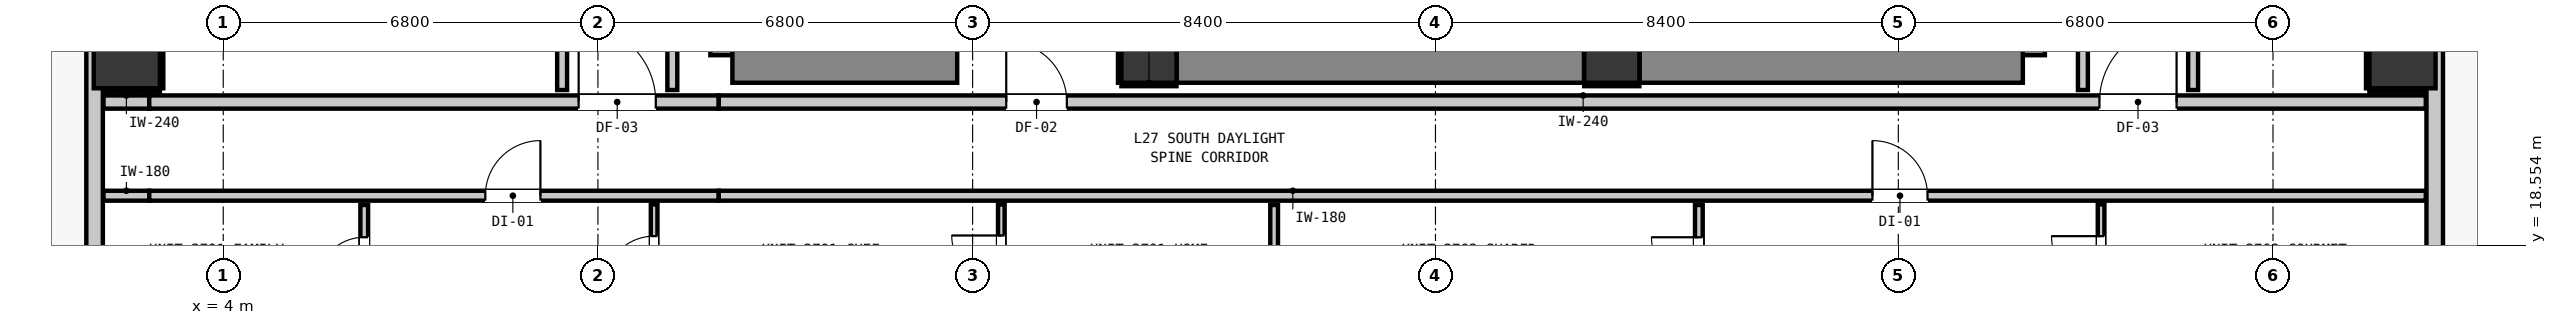
"""IFC4 building model, lengths in metres.
Left out: names, types, materials, properties, quantities, classifications, styles, units other than length and angle.
Written with IfcOpenShell. Run it as: python <this file> out.ifc"""

import sys

from ifc_helpers import new_model, si_unit, direction, frame, frame_2d, origin, origin_2d, place, context, subcontext, project, spatial, rectangle, extrude, element, fill, save


model = new_model("IFC4")
c1 = context("Model", 3, precision=1e-05, world=origin(), true_north=direction((0.0, 1.0)))
c2 = subcontext(c1, "Body", "Model", "MODEL_VIEW")
j1 = project(units=[si_unit("LENGTHUNIT", "METRE"), si_unit("PLANEANGLEUNIT", "RADIAN")], contexts=[c1])
p1 = place(None, origin())
s1 = spatial("IfcSite", under=j1, at=p1, CompositionType="ELEMENT")
p2 = place(p1, origin())
s2 = spatial("IfcBuilding", under=s1, at=p2, CompositionType="ELEMENT")
p3 = place(p2, frame((0.0, 0.0, 96.12)))
s3 = spatial("IfcBuildingStorey", under=s2, at=p3, CompositionType="ELEMENT", Elevation=96.12)
for number, where, z_axis, x_axis in (
    (1, (20.8, 22.0, 0.0), (0.0, 0.0, 1.0), (1.0, 0.0, 0.0)),
    (2, (29.2, 22.0, 0.0), (0.0, 0.0, 1.0), (1.0, 0.0, 0.0)),
):
    element("IfcColumn", number, at=place(p3, frame(where, z_axis=z_axis, x_axis=x_axis)), inside=s3, PredefinedType="COLUMN", context=c2, shape_type="SweptSolid", body=[
        extrude(rectangle(XDim=1.0, YDim=1.0, at=origin_2d()), origin(), (0.0, 0.0, 1.0), 3.32),
    ])
p4 = place(p3, frame((13.34, 22.0, 0.0), z_axis=(0.0, 0.0, 1.0), x_axis=(0.0, 1.0, 0.0)))
e3 = element("IfcWall", 3, at=p4, inside=s3, PredefinedType="SHEAR", context=c2, shape_type="SweptSolid", body=[
    extrude(rectangle(XDim=8.195, YDim=1.0, at=frame_2d((4.098, 0.0))), origin(), (0.0, 0.0, 1.0), 3.32),
])
p5 = place(p3, frame((13.24, 22.0, 0.0), z_axis=(0.0, 0.0, 1.0), x_axis=(1.0, 0.0, 0.0)))
e4 = element("IfcWall", 4, at=p5, inside=s3, PredefinedType="SHEAR", context=c2, shape_type="SweptSolid", body=[
    extrude(rectangle(XDim=4.08, YDim=1.0, at=frame_2d((2.04, 0.0))), origin(), (0.0, 0.0, 1.0), 3.32),
])
p6 = place(p3, frame((36.56, 22.0, 0.0), z_axis=(0.0, 0.0, 1.0), x_axis=(0.0, 1.0, 0.0)))
e5 = element("IfcWall", 5, at=p6, inside=s3, PredefinedType="SHEAR", context=c2, shape_type="SweptSolid", body=[
    extrude(rectangle(XDim=8.195, YDim=1.0, at=frame_2d((4.098, 0.0))), origin(), (0.0, 0.0, 1.0), 3.32),
])
p7 = place(p3, frame((29.705, 22.0, 0.0), z_axis=(0.0, 0.0, 1.0), x_axis=(1.0, 0.0, 0.0)))
e6 = element("IfcWall", 6, at=p7, inside=s3, PredefinedType="SHEAR", context=c2, shape_type="SweptSolid", body=[
    extrude(rectangle(XDim=6.955, YDim=1.0, at=frame_2d((3.478, 0.0))), origin(), (0.0, 0.0, 1.0), 3.32),
])
p8 = place(p3, frame((21.305, 22.0, 0.0), z_axis=(0.0, 0.0, 1.0), x_axis=(1.0, 0.0, 0.0)))
e7 = element("IfcWall", 7, at=p8, inside=s3, PredefinedType="SHEAR", context=c2, shape_type="SweptSolid", body=[
    extrude(rectangle(XDim=7.39, YDim=1.0, at=frame_2d((3.695, 0.0))), origin(), (0.0, 0.0, 1.0), 3.32),
])
for number, where, z_axis, x_axis in (
    (8, (2.25, 22.0, 0.0), (0.0, 0.0, 1.0), (1.0, 0.0, 0.0)),
    (9, (43.55, 22.0, 0.0), (0.0, 0.0, 1.0), (1.0, 0.0, 0.0)),
):
    element("IfcColumn", number, at=place(p3, frame(where, z_axis=z_axis, x_axis=x_axis)), inside=s3, PredefinedType="COLUMN", context=c2, shape_type="SweptSolid", body=[
        extrude(rectangle(XDim=1.2, YDim=1.2, at=origin_2d()), origin(), (0.0, 0.0, 1.0), 3.32),
    ])
p9 = place(p3, frame((1.665, 16.365, 0.0), z_axis=(0.0, 0.0, 1.0), x_axis=(0.0, 1.0, 0.0)))
e10 = element("IfcWall", 10, at=p9, inside=s3, PredefinedType="STANDARD", context=c2, shape_type="SweptSolid", body=[
    extrude(rectangle(XDim=34.67, YDim=0.3, at=frame_2d((17.335, 0.0))), origin(), (0.0, 0.0, 1.0), 3.06),
])
p10 = place(p9, frame((6.854, 0.0, 0.0)))
e11 = element("IfcOpeningElement", 11, at=p10, cuts=e10, PredefinedType="OPENING", context=c2, shape_type="SweptSolid", body=[
    extrude(rectangle(XDim=1.0, YDim=2.15, at=frame_2d((0.5, 1.075))), frame((0.0, 0.16, 0.0), z_axis=(0.0, -1.0, 0.0), x_axis=(1.0, 0.0, 0.0)), (0.0, 0.0, 1.0), 0.32),
])
p11 = place(p9, frame((32.839, 0.0, 0.85)))
e12 = element("IfcOpeningElement", 12, at=p11, cuts=e10, PredefinedType="OPENING", context=c2, shape_type="SweptSolid", body=[
    extrude(rectangle(XDim=1.05, YDim=1.65, at=frame_2d((0.525, 0.825))), frame((0.0, 0.16, 0.0), z_axis=(0.0, -1.0, 0.0), x_axis=(1.0, 0.0, 0.0)), (0.0, 0.0, 1.0), 0.32),
])
p12 = place(p9, frame((10.044, 0.0, 0.85)))
e13 = element("IfcOpeningElement", 13, at=p12, cuts=e10, PredefinedType="OPENING", context=c2, shape_type="SweptSolid", body=[
    extrude(rectangle(XDim=2.4, YDim=1.95, at=frame_2d((1.2, 0.975))), frame((0.0, 0.16, 0.0), z_axis=(0.0, -1.0, 0.0), x_axis=(1.0, 0.0, 0.0)), (0.0, 0.0, 1.0), 0.32),
])
p13 = place(p9, frame((19.145, 0.0, 0.85)))
e14 = element("IfcOpeningElement", 14, at=p13, cuts=e10, PredefinedType="OPENING", context=c2, shape_type="SweptSolid", body=[
    extrude(rectangle(XDim=2.4, YDim=1.95, at=frame_2d((1.2, 0.975))), frame((0.0, 0.16, 0.0), z_axis=(0.0, -1.0, 0.0), x_axis=(1.0, 0.0, 0.0)), (0.0, 0.0, 1.0), 0.32),
])
p14 = place(p3, frame((44.135, 51.035, 0.0), z_axis=(0.0, 0.0, 1.0), x_axis=(0.0, -1.0, 0.0)))
e15 = element("IfcWall", 15, at=p14, inside=s3, PredefinedType="STANDARD", context=c2, shape_type="SweptSolid", body=[
    extrude(rectangle(XDim=34.67, YDim=0.3, at=frame_2d((17.335, 0.0))), origin(), (0.0, 0.0, 1.0), 3.06),
])
p15 = place(p14, frame((0.901, 0.0, 0.0)))
e16 = element("IfcOpeningElement", 16, at=p15, cuts=e15, PredefinedType="OPENING", context=c2, shape_type="SweptSolid", body=[
    extrude(rectangle(XDim=1.0, YDim=2.15, at=frame_2d((0.5, 1.075))), frame((0.0, 0.16, 0.0), z_axis=(0.0, -1.0, 0.0), x_axis=(1.0, 0.0, 0.0)), (0.0, 0.0, 1.0), 0.32),
])
p16 = place(p14, frame((3.303, 0.0, 0.85)))
e17 = element("IfcOpeningElement", 17, at=p16, cuts=e15, PredefinedType="OPENING", context=c2, shape_type="SweptSolid", body=[
    extrude(rectangle(XDim=2.4, YDim=1.95, at=frame_2d((1.2, 0.975))), frame((0.0, 0.16, 0.0), z_axis=(0.0, -1.0, 0.0), x_axis=(1.0, 0.0, 0.0)), (0.0, 0.0, 1.0), 0.32),
])
p17 = place(p14, frame((21.61, 0.0, 0.85)))
e18 = element("IfcOpeningElement", 18, at=p17, cuts=e15, PredefinedType="OPENING", context=c2, shape_type="SweptSolid", body=[
    extrude(rectangle(XDim=2.4, YDim=1.95, at=frame_2d((1.2, 0.975))), frame((0.0, 0.16, 0.0), z_axis=(0.0, -1.0, 0.0), x_axis=(1.0, 0.0, 0.0)), (0.0, 0.0, 1.0), 0.32),
])
p18 = place(p3, frame((1.827, 21.15, 0.0), z_axis=(0.0, 0.0, 1.0), x_axis=(1.0, 0.0, 0.0)))
e19 = element("IfcWall", 19, at=p18, inside=s3, PredefinedType="PARTITIONING", context=c2, shape_type="SweptSolid", body=[
    extrude(rectangle(XDim=0.83, YDim=0.24, at=frame_2d((0.415, 0.0))), origin(), (0.0, 0.0, 1.0), 3.06),
])
p19 = place(p3, frame((2.657, 21.15, 0.0), z_axis=(0.0, 0.0, 1.0), x_axis=(1.0, 0.0, 0.0)))
e20 = element("IfcWall", 20, at=p19, inside=s3, PredefinedType="PARTITIONING", context=c2, shape_type="SweptSolid", body=[
    extrude(rectangle(XDim=10.336, YDim=0.24, at=frame_2d((5.168, 0.0))), origin(), (0.0, 0.0, 1.0), 2.445),
])
p20 = place(p19, frame((7.793, 0.0, 0.0)))
e21 = element("IfcOpeningElement", 21, at=p20, cuts=e20, PredefinedType="OPENING", context=c2, shape_type="SweptSolid", body=[
    extrude(rectangle(XDim=1.4, YDim=2.15, at=frame_2d((0.7, 1.075))), frame((0.0, 0.13, 0.0), z_axis=(0.0, -1.0, 0.0), x_axis=(1.0, 0.0, 0.0)), (0.0, 0.0, 1.0), 0.26),
])
p21 = place(p3, frame((12.993, 21.15, 0.0), z_axis=(0.0, 0.0, 1.0), x_axis=(1.0, 0.0, 0.0)))
e22 = element("IfcWall", 22, at=p21, inside=s3, PredefinedType="PARTITIONING", context=c2, shape_type="SweptSolid", body=[
    extrude(rectangle(XDim=30.98, YDim=0.24, at=frame_2d((15.49, 0.0))), origin(), (0.0, 0.0, 1.0), 3.06),
])
p22 = place(p21, frame((5.217, 0.0, 0.0)))
e23 = element("IfcOpeningElement", 23, at=p22, cuts=e22, PredefinedType="OPENING", context=c2, shape_type="SweptSolid", body=[
    extrude(rectangle(XDim=1.1, YDim=2.15, at=frame_2d((0.55, 1.075))), frame((0.0, 0.13, 0.0), z_axis=(0.0, -1.0, 0.0), x_axis=(1.0, 0.0, 0.0)), (0.0, 0.0, 1.0), 0.26),
])
p23 = place(p21, frame((25.057, 0.0, 0.0)))
e24 = element("IfcOpeningElement", 24, at=p23, cuts=e22, PredefinedType="OPENING", context=c2, shape_type="SweptSolid", body=[
    extrude(rectangle(XDim=1.4, YDim=2.15, at=frame_2d((0.7, 1.075))), frame((0.0, 0.13, 0.0), z_axis=(0.0, -1.0, 0.0), x_axis=(1.0, 0.0, 0.0)), (0.0, 0.0, 1.0), 0.26),
])
p24 = place(p3, frame((1.827, 19.45, 0.0), z_axis=(0.0, 0.0, 1.0), x_axis=(1.0, 0.0, 0.0)))
e25 = element("IfcWall", 25, at=p24, inside=s3, PredefinedType="PARTITIONING", context=c2, shape_type="SweptSolid", body=[
    extrude(rectangle(XDim=0.83, YDim=0.18, at=frame_2d((0.415, 0.0))), origin(), (0.0, 0.0, 1.0), 3.06),
])
p25 = place(p3, frame((2.657, 19.45, 0.0), z_axis=(0.0, 0.0, 1.0), x_axis=(1.0, 0.0, 0.0)))
e26 = element("IfcWall", 26, at=p25, inside=s3, PredefinedType="PARTITIONING", context=c2, shape_type="SweptSolid", body=[
    extrude(rectangle(XDim=10.336, YDim=0.18, at=frame_2d((5.168, 0.0))), origin(), (0.0, 0.0, 1.0), 2.445),
])
p26 = place(p25, frame((6.099, 0.0, 0.0)))
e27 = element("IfcOpeningElement", 27, at=p26, cuts=e26, PredefinedType="OPENING", context=c2, shape_type="SweptSolid", body=[
    extrude(rectangle(XDim=1.0, YDim=2.15, at=frame_2d((0.5, 1.075))), frame((0.0, 0.1, 0.0), z_axis=(0.0, -1.0, 0.0), x_axis=(1.0, 0.0, 0.0)), (0.0, 0.0, 1.0), 0.2),
])
p27 = place(p3, frame((12.993, 19.45, 0.0), z_axis=(0.0, 0.0, 1.0), x_axis=(1.0, 0.0, 0.0)))
e28 = element("IfcWall", 28, at=p27, inside=s3, PredefinedType="PARTITIONING", context=c2, shape_type="SweptSolid", body=[
    extrude(rectangle(XDim=30.98, YDim=0.18, at=frame_2d((15.49, 0.0))), origin(), (0.0, 0.0, 1.0), 3.06),
])
p28 = place(p27, frame((20.937, 0.0, 0.0)))
e29 = element("IfcOpeningElement", 29, at=p28, cuts=e28, PredefinedType="OPENING", context=c2, shape_type="SweptSolid", body=[
    extrude(rectangle(XDim=1.0, YDim=2.15, at=frame_2d((0.5, 1.075))), frame((0.0, 0.1, 0.0), z_axis=(0.0, -1.0, 0.0), x_axis=(1.0, 0.0, 0.0)), (0.0, 0.0, 1.0), 0.2),
])
p29 = place(p3, frame((10.15, 21.368, 0.0), z_axis=(0.0, 0.0, 1.0), x_axis=(0.0, 1.0, 0.0)))
e30 = element("IfcWall", 30, at=p29, inside=s3, PredefinedType="PARTITIONING", context=c2, shape_type="SweptSolid", body=[
    extrude(rectangle(XDim=3.492, YDim=0.18, at=frame_2d((1.746, 0.0))), origin(), (0.0, 0.0, 1.0), 3.06),
])
for number, where, z_axis, x_axis in (
    (31, (12.15, 21.368, 0.0), (0.0, 0.0, 1.0), (0.0, 1.0, 0.0)),
    (32, (37.75, 21.368, 0.0), (0.0, 0.0, 1.0), (0.0, 1.0, 0.0)),
):
    element("IfcWall", number, at=place(p3, frame(where, z_axis=z_axis, x_axis=x_axis)), inside=s3, PredefinedType="PARTITIONING", context=c2, shape_type="SweptSolid", body=[
        extrude(rectangle(XDim=18.694, YDim=0.18, at=frame_2d((9.347, 0.0))), origin(), (0.0, 0.0, 1.0), 3.06),
    ])
p30 = place(p3, frame((39.75, 21.368, 0.0), z_axis=(0.0, 0.0, 1.0), x_axis=(0.0, 1.0, 0.0)))
e33 = element("IfcWall", 33, at=p30, inside=s3, PredefinedType="PARTITIONING", context=c2, shape_type="SweptSolid", body=[
    extrude(rectangle(XDim=4.714, YDim=0.18, at=frame_2d((2.357, 0.0))), origin(), (0.0, 0.0, 1.0), 3.06),
])
p31 = place(p3, frame((6.559, 17.255, 0.0), z_axis=(0.0, 0.0, 1.0), x_axis=(0.0, 1.0, 0.0)))
e34 = element("IfcWall", 34, at=p31, inside=s3, PredefinedType="PARTITIONING", context=c2, shape_type="SweptSolid", body=[
    extrude(rectangle(XDim=2.027, YDim=0.14, at=frame_2d((1.014, 0.0))), origin(), (0.0, 0.0, 1.0), 3.06),
])
p32 = place(p31, frame((0.581, 0.0, 0.0)))
e35 = element("IfcOpeningElement", 35, at=p32, cuts=e34, PredefinedType="OPENING", context=c2, shape_type="SweptSolid", body=[
    extrude(rectangle(XDim=0.86, YDim=2.02, at=frame_2d((0.43, 1.01))), frame((0.0, 0.08, 0.0), z_axis=(0.0, -1.0, 0.0), x_axis=(1.0, 0.0, 0.0)), (0.0, 0.0, 1.0), 0.16),
])
p33 = place(p3, frame((23.072, 17.255, 0.0), z_axis=(0.0, 0.0, 1.0), x_axis=(0.0, 1.0, 0.0)))
e36 = element("IfcWall", 36, at=p33, inside=s3, PredefinedType="PARTITIONING", context=c2, shape_type="SweptSolid", body=[
    extrude(rectangle(XDim=2.027, YDim=0.14, at=frame_2d((1.014, 0.0))), origin(), (0.0, 0.0, 1.0), 3.06),
])
p34 = place(p3, frame((30.78, 17.255, 0.0), z_axis=(0.0, 0.0, 1.0), x_axis=(0.0, 1.0, 0.0)))
e37 = element("IfcWall", 37, at=p34, inside=s3, PredefinedType="PARTITIONING", context=c2, shape_type="SweptSolid", body=[
    extrude(rectangle(XDim=2.027, YDim=0.14, at=frame_2d((1.014, 0.0))), origin(), (0.0, 0.0, 1.0), 3.06),
])
p35 = place(p34, frame((0.581, 0.0, 0.0)))
e38 = element("IfcOpeningElement", 38, at=p35, cuts=e37, PredefinedType="OPENING", context=c2, shape_type="SweptSolid", body=[
    extrude(rectangle(XDim=0.86, YDim=2.02, at=frame_2d((0.43, 1.01))), frame((0.0, 0.08, 0.0), z_axis=(0.0, -1.0, 0.0), x_axis=(1.0, 0.0, 0.0)), (0.0, 0.0, 1.0), 0.16),
])
p36 = place(p3, frame((11.82, 17.245, 0.0), z_axis=(0.0, 0.0, 1.0), x_axis=(0.0, 1.0, 0.0)))
e39 = element("IfcWall", 39, at=p36, inside=s3, PredefinedType="PARTITIONING", context=c2, shape_type="SweptSolid", body=[
    extrude(rectangle(XDim=2.047, YDim=0.12, at=frame_2d((1.023, 0.0))), origin(), (0.0, 0.0, 1.0), 3.06),
])
p37 = place(p36, frame((0.571, 0.0, 0.0)))
e40 = element("IfcOpeningElement", 40, at=p37, cuts=e39, PredefinedType="OPENING", context=c2, shape_type="SweptSolid", body=[
    extrude(rectangle(XDim=0.9, YDim=2.1, at=frame_2d((0.45, 1.05))), frame((0.0, 0.07, 0.0), z_axis=(0.0, -1.0, 0.0), x_axis=(1.0, 0.0, 0.0)), (0.0, 0.0, 1.0), 0.14),
])
p38 = place(p3, frame((18.121, 17.245, 0.0), z_axis=(0.0, 0.0, 1.0), x_axis=(0.0, 1.0, 0.0)))
e41 = element("IfcWall", 41, at=p38, inside=s3, PredefinedType="PARTITIONING", context=c2, shape_type="SweptSolid", body=[
    extrude(rectangle(XDim=2.047, YDim=0.12, at=frame_2d((1.023, 0.0))), origin(), (0.0, 0.0, 1.0), 3.06),
])
p39 = place(p38, frame((0.583, 0.0, 0.0)))
e42 = element("IfcOpeningElement", 42, at=p39, cuts=e41, PredefinedType="OPENING", context=c2, shape_type="SweptSolid", body=[
    extrude(rectangle(XDim=0.9, YDim=2.1, at=frame_2d((0.45, 1.05))), frame((0.0, 0.07, 0.0), z_axis=(0.0, -1.0, 0.0), x_axis=(1.0, 0.0, 0.0)), (0.0, 0.0, 1.0), 0.14),
])
p40 = place(p3, frame((38.08, 17.245, 0.0), z_axis=(0.0, 0.0, 1.0), x_axis=(0.0, 1.0, 0.0)))
e43 = element("IfcWall", 43, at=p40, inside=s3, PredefinedType="PARTITIONING", context=c2, shape_type="SweptSolid", body=[
    extrude(rectangle(XDim=2.047, YDim=0.12, at=frame_2d((1.023, 0.0))), origin(), (0.0, 0.0, 1.0), 3.06),
])
p41 = place(p40, frame((0.571, 0.0, 0.0)))
e44 = element("IfcOpeningElement", 44, at=p41, cuts=e43, PredefinedType="OPENING", context=c2, shape_type="SweptSolid", body=[
    extrude(rectangle(XDim=0.9, YDim=2.1, at=frame_2d((0.45, 1.05))), frame((0.0, 0.07, 0.0), z_axis=(0.0, -1.0, 0.0), x_axis=(1.0, 0.0, 0.0)), (0.0, 0.0, 1.0), 0.14),
])
for number, where, z_axis, x_axis in (
    (45, (20.3, 21.468, 0.0), (0.0, 0.0, 1.0), (1.0, 0.0, 0.0)),
    (46, (20.268, 21.5, 0.0), (0.0, 0.0, 1.0), (0.0, 1.0, 0.0)),
    (47, (28.7, 21.468, 0.0), (0.0, 0.0, 1.0), (1.0, 0.0, 0.0)),
):
    element("IfcWall", number, at=place(p3, frame(where, z_axis=z_axis, x_axis=x_axis)), inside=s3, PredefinedType="PARTITIONING", context=c2, shape_type="SweptSolid", body=[
        extrude(rectangle(XDim=1.0, YDim=0.06, at=frame_2d((0.5, 0.0))), origin(), (0.0, 0.0, 1.0), 1.45),
    ])
p42 = place(p3, frame((1.83, 21.368, 0.0), z_axis=(0.0, 0.0, 1.0), x_axis=(1.0, 0.0, 0.0)))
e48 = element("IfcWall", 48, at=p42, inside=s3, PredefinedType="PARTITIONING", context=c2, shape_type="SweptSolid", body=[
    extrude(rectangle(XDim=1.02, YDim=0.06, at=frame_2d((0.51, 0.0))), origin(), (0.0, 0.0, 1.0), 1.45),
])
p43 = place(p3, frame((2.882, 21.4, 0.0), z_axis=(0.0, 0.0, 1.0), x_axis=(0.0, 1.0, 0.0)))
e49 = element("IfcWall", 49, at=p43, inside=s3, PredefinedType="PARTITIONING", context=c2, shape_type="SweptSolid", body=[
    extrude(rectangle(XDim=1.2, YDim=0.06, at=frame_2d((0.6, 0.0))), origin(), (0.0, 0.0, 1.0), 1.45),
])
p44 = place(p3, frame((42.95, 21.368, 0.0), z_axis=(0.0, 0.0, 1.0), x_axis=(1.0, 0.0, 0.0)))
e50 = element("IfcWall", 50, at=p44, inside=s3, PredefinedType="PARTITIONING", context=c2, shape_type="SweptSolid", body=[
    extrude(rectangle(XDim=1.02, YDim=0.06, at=frame_2d((0.51, 0.0))), origin(), (0.0, 0.0, 1.0), 1.45),
])
p45 = place(p3, frame((42.918, 21.4, 0.0), z_axis=(0.0, 0.0, 1.0), x_axis=(0.0, 1.0, 0.0)))
e51 = element("IfcWall", 51, at=p45, inside=s3, PredefinedType="PARTITIONING", context=c2, shape_type="SweptSolid", body=[
    extrude(rectangle(XDim=1.2, YDim=0.06, at=frame_2d((0.6, 0.0))), origin(), (0.0, 0.0, 1.0), 1.45),
])
p46 = place(p22, origin())
e52 = element("IfcDoor", 52, at=p46, inside=s3, OperationType="SINGLE_SWING_LEFT", PredefinedType="DOOR", context=c2, shape_type="SweptSolid", body=[
    extrude(rectangle(XDim=1.1, YDim=2.15, at=frame_2d((0.55, 1.075))), frame((0.0, 0.025, 0.0), z_axis=(0.0, -1.0, 0.0), x_axis=(1.0, 0.0, 0.0)), (0.0, 0.0, 1.0), 0.05),
])
fill(e23, e52)
p47 = place(p20, origin())
e53 = element("IfcDoor", 53, at=p47, inside=s3, OperationType="SINGLE_SWING_LEFT", PredefinedType="DOOR", context=c2, shape_type="SweptSolid", body=[
    extrude(rectangle(XDim=1.4, YDim=2.15, at=frame_2d((0.7, 1.075))), frame((0.0, 0.025, 0.0), z_axis=(0.0, -1.0, 0.0), x_axis=(1.0, 0.0, 0.0)), (0.0, 0.0, 1.0), 0.05),
])
fill(e21, e53)
p48 = place(p23, origin())
e54 = element("IfcDoor", 54, at=p48, inside=s3, OperationType="SINGLE_SWING_RIGHT", PredefinedType="DOOR", context=c2, shape_type="SweptSolid", body=[
    extrude(rectangle(XDim=1.4, YDim=2.15, at=frame_2d((0.7, 1.075))), frame((0.0, 0.025, 0.0), z_axis=(0.0, -1.0, 0.0), x_axis=(1.0, 0.0, 0.0)), (0.0, 0.0, 1.0), 0.05),
])
fill(e24, e54)
p49 = place(p26, origin())
e55 = element("IfcDoor", 55, at=p49, inside=s3, OperationType="SINGLE_SWING_RIGHT", PredefinedType="DOOR", context=c2, shape_type="SweptSolid", body=[
    extrude(rectangle(XDim=1.0, YDim=2.15, at=frame_2d((0.5, 1.075))), frame((0.0, 0.025, 0.0), z_axis=(0.0, -1.0, 0.0), x_axis=(1.0, 0.0, 0.0)), (0.0, 0.0, 1.0), 0.05),
])
fill(e27, e55)
p50 = place(p32, origin())
e56 = element("IfcDoor", 56, at=p50, inside=s3, OperationType="SINGLE_SWING_LEFT", PredefinedType="DOOR", context=c2, shape_type="SweptSolid", body=[
    extrude(rectangle(XDim=0.86, YDim=2.02, at=frame_2d((0.43, 1.01))), frame((0.0, 0.025, 0.0), z_axis=(0.0, -1.0, 0.0), x_axis=(1.0, 0.0, 0.0)), (0.0, 0.0, 1.0), 0.05),
])
fill(e35, e56)
p51 = place(p37, origin())
e57 = element("IfcDoor", 57, at=p51, inside=s3, OperationType="SINGLE_SWING_LEFT", PredefinedType="DOOR", context=c2, shape_type="SweptSolid", body=[
    extrude(rectangle(XDim=0.9, YDim=2.1, at=frame_2d((0.45, 1.05))), frame((0.0, 0.025, 0.0), z_axis=(0.0, -1.0, 0.0), x_axis=(1.0, 0.0, 0.0)), (0.0, 0.0, 1.0), 0.05),
])
fill(e40, e57)
p52 = place(p39, origin())
e58 = element("IfcDoor", 58, at=p52, inside=s3, OperationType="SINGLE_SWING_RIGHT", PredefinedType="DOOR", context=c2, shape_type="SweptSolid", body=[
    extrude(rectangle(XDim=0.9, YDim=2.1, at=frame_2d((0.45, 1.05))), frame((0.0, 0.025, 0.0), z_axis=(0.0, -1.0, 0.0), x_axis=(1.0, 0.0, 0.0)), (0.0, 0.0, 1.0), 0.05),
])
fill(e42, e58)
p53 = place(p28, origin())
e59 = element("IfcDoor", 59, at=p53, inside=s3, OperationType="SINGLE_SWING_LEFT", PredefinedType="DOOR", context=c2, shape_type="SweptSolid", body=[
    extrude(rectangle(XDim=1.0, YDim=2.15, at=frame_2d((0.5, 1.075))), frame((0.0, 0.025, 0.0), z_axis=(0.0, -1.0, 0.0), x_axis=(1.0, 0.0, 0.0)), (0.0, 0.0, 1.0), 0.05),
])
fill(e29, e59)
p54 = place(p35, origin())
e60 = element("IfcDoor", 60, at=p54, inside=s3, OperationType="SINGLE_SWING_RIGHT", PredefinedType="DOOR", context=c2, shape_type="SweptSolid", body=[
    extrude(rectangle(XDim=0.86, YDim=2.02, at=frame_2d((0.43, 1.01))), frame((0.0, 0.025, 0.0), z_axis=(0.0, -1.0, 0.0), x_axis=(1.0, 0.0, 0.0)), (0.0, 0.0, 1.0), 0.05),
])
fill(e38, e60)
p55 = place(p41, origin())
e61 = element("IfcDoor", 61, at=p55, inside=s3, OperationType="SINGLE_SWING_RIGHT", PredefinedType="DOOR", context=c2, shape_type="SweptSolid", body=[
    extrude(rectangle(XDim=0.9, YDim=2.1, at=frame_2d((0.45, 1.05))), frame((0.0, 0.025, 0.0), z_axis=(0.0, -1.0, 0.0), x_axis=(1.0, 0.0, 0.0)), (0.0, 0.0, 1.0), 0.05),
])
fill(e44, e61)
save(model, sys.argv[1])
